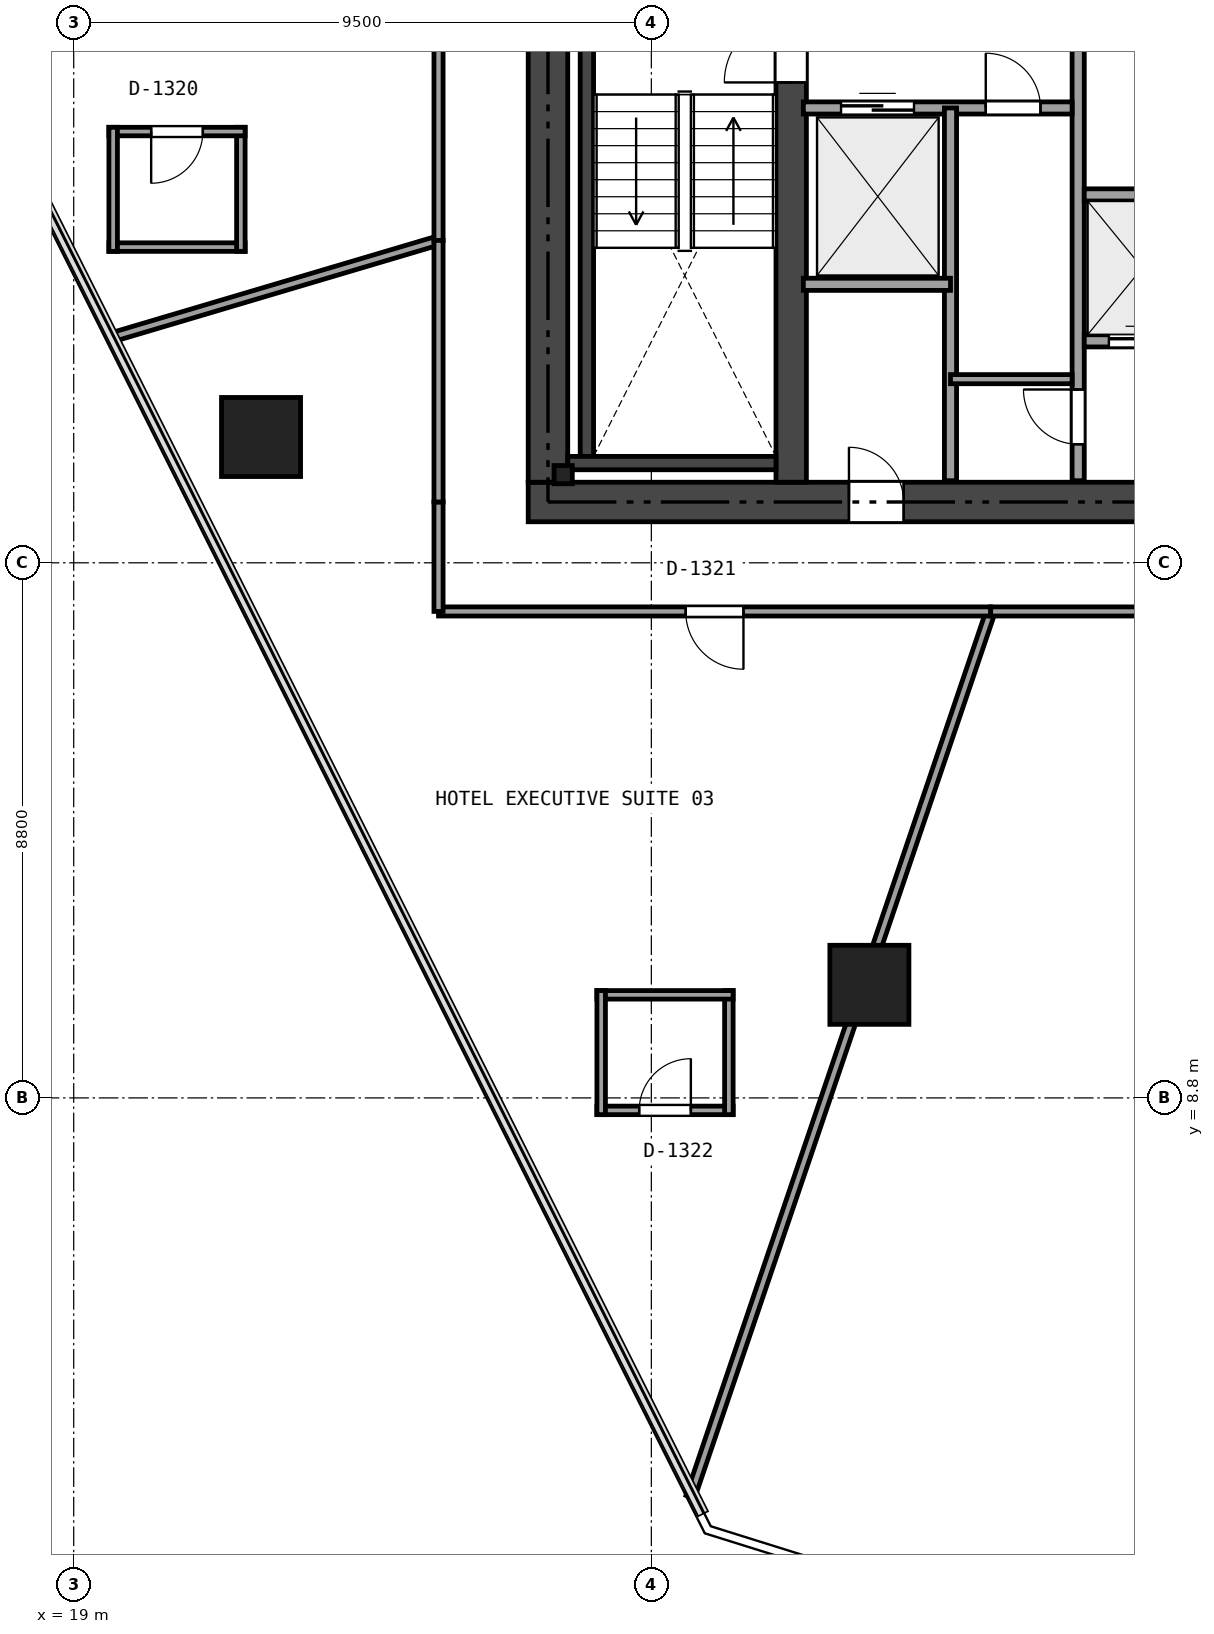
"""IFC4 building model, lengths in metres.
Left out: names, types, materials, properties, quantities, classifications, styles, units other than length and angle.
Written with IfcOpenShell. Run it as: python <this file> out.ifc"""

import sys

from ifc_helpers import new_model, si_unit, direction, frame, frame_2d, origin, origin_2d, place, context, subcontext, project, spatial, rectangle, i_section, extrude, element, fill, save


model = new_model("IFC4")
c1 = context("Model", 3, precision=1e-05, world=origin(), true_north=direction((0.0, 1.0)))
c2 = subcontext(c1, "Body", "Model", "MODEL_VIEW")
j1 = project(units=[si_unit("LENGTHUNIT", "METRE"), si_unit("PLANEANGLEUNIT", "RADIAN")], contexts=[c1])
p1 = place(None, origin())
s1 = spatial("IfcSite", under=j1, at=p1, CompositionType="ELEMENT")
p2 = place(p1, origin())
s2 = spatial("IfcBuilding", under=s1, at=p2, CompositionType="ELEMENT")
p3 = place(p2, frame((0.0, 0.0, 54.6)))
s3 = spatial("IfcBuildingStorey", under=s2, at=p3, CompositionType="ELEMENT", Elevation=54.6)
p4 = place(p3, frame((26.475, 18.6, 0.0), z_axis=(0.0, 0.0, 1.0), x_axis=(1.0, 0.0, 0.0)))
e1 = element("IfcWall", 1, at=p4, inside=s3, PredefinedType="SHEAR", context=c2, shape_type="SweptSolid", body=[
    extrude(rectangle(XDim=21.45, YDim=0.65, at=frame_2d((10.725, 0.0))), origin(), (0.0, 0.0, 1.0), 3.17),
])
p5 = place(p4, frame((12.45, 0.0, 0.0)))
e2 = element("IfcOpeningElement", 2, at=p5, cuts=e1, PredefinedType="OPENING", context=c2, shape_type="SweptSolid", body=[
    extrude(rectangle(XDim=1.15, YDim=2.15, at=frame_2d((0.575, 1.075))), frame((0.0, 0.335, 0.0), z_axis=(0.0, -1.0, 0.0), x_axis=(1.0, 0.0, 0.0)), (0.0, 0.0, 1.0), 0.67),
])
p6 = place(p4, frame((5.275, 0.0, 0.0)))
e3 = element("IfcOpeningElement", 3, at=p6, cuts=e1, PredefinedType="OPENING", context=c2, shape_type="SweptSolid", body=[
    extrude(rectangle(XDim=0.9, YDim=2.1, at=frame_2d((0.45, 1.05))), frame((0.0, 0.335, 0.0), z_axis=(0.0, -1.0, 0.0), x_axis=(1.0, 0.0, 0.0)), (0.0, 0.0, 1.0), 0.67),
])
p7 = place(p3, frame((26.8, 18.925, 0.0), z_axis=(0.0, 0.0, 1.0), x_axis=(0.0, 1.0, 0.0)))
e4 = element("IfcWall", 4, at=p7, inside=s3, PredefinedType="SHEAR", context=c2, shape_type="SweptSolid", body=[
    extrude(rectangle(XDim=14.95, YDim=0.65, at=frame_2d((7.475, 0.0))), origin(), (0.0, 0.0, 1.0), 3.17),
])
p8 = place(p3, frame((30.8, 18.925, 0.0), z_axis=(0.0, 0.0, 1.0), x_axis=(0.0, 1.0, 0.0)))
e5 = element("IfcWall", 5, at=p8, inside=s3, PredefinedType="SHEAR", context=c2, shape_type="SweptSolid", body=[
    extrude(rectangle(XDim=14.95, YDim=0.5, at=frame_2d((7.475, 0.0))), origin(), (0.0, 0.0, 1.0), 3.17),
])
p9 = place(p8, frame((6.575, 0.0, 0.0)))
e6 = element("IfcOpeningElement", 6, at=p9, cuts=e5, PredefinedType="OPENING", context=c2, shape_type="SweptSolid", body=[
    extrude(rectangle(XDim=1.1, YDim=2.15, at=frame_2d((0.55, 1.075))), frame((0.0, 0.26, 0.0), z_axis=(0.0, -1.0, 0.0), x_axis=(1.0, 0.0, 0.0)), (0.0, 0.0, 1.0), 0.52),
])
p10 = place(p8, frame((8.375, 0.0, 0.0)))
e7 = element("IfcOpeningElement", 7, at=p10, cuts=e5, PredefinedType="OPENING", context=c2, shape_type="SweptSolid", body=[
    extrude(rectangle(XDim=0.9, YDim=2.1, at=frame_2d((0.45, 1.05))), frame((0.0, 0.26, 0.0), z_axis=(0.0, -1.0, 0.0), x_axis=(1.0, 0.0, 0.0)), (0.0, 0.0, 1.0), 0.52),
])
p11 = place(p3, frame((27.44, 19.35, 0.0), z_axis=(0.0, 0.0, 1.0), x_axis=(0.0, 1.0, 0.0)))
e8 = element("IfcWall", 8, at=p11, inside=s3, PredefinedType="SHEAR", context=c2, shape_type="SweptSolid", body=[
    extrude(rectangle(XDim=7.4, YDim=0.22, at=frame_2d((3.7, 0.0))), origin(), (0.0, 0.0, 1.0), 3.17),
])
p12 = place(p3, frame((27.125, 19.24, 0.0), z_axis=(0.0, 0.0, 1.0), x_axis=(1.0, 0.0, 0.0)))
e9 = element("IfcWall", 9, at=p12, inside=s3, PredefinedType="SHEAR", context=c2, shape_type="SweptSolid", body=[
    extrude(rectangle(XDim=3.425, YDim=0.22, at=frame_2d((1.712, 0.0))), origin(), (0.0, 0.0, 1.0), 3.17),
])
for number, where, z_axis, x_axis in (
    (10, (22.081, 19.669, 0.0), (0.0, 0.0, 1.0), (1.0, 0.0, 0.0)),
    (11, (32.086, 10.66, 0.0), (0.0, 0.0, 1.0), (1.0, 0.0, 0.0)),
):
    element("IfcColumn", number, at=place(p3, frame(where, z_axis=z_axis, x_axis=x_axis)), inside=s3, PredefinedType="COLUMN", context=c2, shape_type="SweptSolid", body=[
        extrude(rectangle(XDim=1.3, YDim=1.3, at=origin_2d()), origin(), (0.0, 0.0, 1.0), 3.17),
    ])
p13 = place(p3, frame((27.05, 19.05, 0.0), z_axis=(0.0, 0.0, 1.0), x_axis=(1.0, 0.0, 0.0)))
e12 = element("IfcColumn", 12, at=p13, inside=s3, PredefinedType="PILASTER", context=c2, shape_type="SweptSolid", body=[
    extrude(i_section(OverallWidth=0.3, OverallDepth=0.3, WebThickness=0.011, FlangeThickness=0.019, at=origin_2d()), origin(), (0.0, 0.0, 1.0), 3.17),
])
p14 = place(p3, frame((35.52, 18.95, 0.0), z_axis=(0.0, 0.0, 1.0), x_axis=(0.0, 1.0, 0.0)))
e13 = element("IfcWall", 13, at=p14, inside=s3, PredefinedType="SOLIDWALL", context=c2, shape_type="SweptSolid", body=[
    extrude(rectangle(XDim=14.9, YDim=0.2, at=frame_2d((7.45, 0.0))), origin(), (0.0, 0.0, 1.0), 2.691),
])
p15 = place(p14, frame((7.755, 0.0, 0.0)))
e14 = element("IfcOpeningElement", 14, at=p15, cuts=e13, PredefinedType="OPENING", context=c2, shape_type="SweptSolid", body=[
    extrude(rectangle(XDim=0.95, YDim=2.15, at=frame_2d((0.475, 1.075))), frame((0.0, 0.11, 0.0), z_axis=(0.0, -1.0, 0.0), x_axis=(1.0, 0.0, 0.0)), (0.0, 0.0, 1.0), 0.22),
])
p16 = place(p14, frame((0.6, 0.0, 0.0)))
e15 = element("IfcOpeningElement", 15, at=p16, cuts=e13, PredefinedType="OPENING", context=c2, shape_type="SweptSolid", body=[
    extrude(rectangle(XDim=0.9, YDim=2.1, at=frame_2d((0.45, 1.05))), frame((0.0, 0.11, 0.0), z_axis=(0.0, -1.0, 0.0), x_axis=(1.0, 0.0, 0.0)), (0.0, 0.0, 1.0), 0.22),
])
p17 = place(p3, frame((31.0, 25.08, 0.0), z_axis=(0.0, 0.0, 1.0), x_axis=(1.0, 0.0, 0.0)))
e16 = element("IfcWall", 16, at=p17, inside=s3, PredefinedType="SOLIDWALL", context=c2, shape_type="SweptSolid", body=[
    extrude(rectangle(XDim=4.42, YDim=0.2, at=frame_2d((2.21, 0.0))), origin(), (0.0, 0.0, 1.0), 3.17),
])
p18 = place(p17, frame((3.0, 0.0, 0.0)))
e17 = element("IfcOpeningElement", 17, at=p18, cuts=e16, PredefinedType="OPENING", context=c2, shape_type="SweptSolid", body=[
    extrude(rectangle(XDim=0.9, YDim=2.1, at=frame_2d((0.45, 1.05))), frame((0.0, 0.11, 0.0), z_axis=(0.0, -1.0, 0.0), x_axis=(1.0, 0.0, 0.0)), (0.0, 0.0, 1.0), 0.22),
])
p19 = place(p17, frame((0.62, 0.0, 0.0)))
e18 = element("IfcOpeningElement", 18, at=p19, cuts=e16, PredefinedType="OPENING", context=c2, shape_type="SweptSolid", body=[
    extrude(rectangle(XDim=1.2, YDim=2.15, at=frame_2d((0.6, 1.075))), frame((0.0, 0.11, 0.0), z_axis=(0.0, -1.0, 0.0), x_axis=(1.0, 0.0, 0.0)), (0.0, 0.0, 1.0), 0.22),
])
p20 = place(p3, frame((33.42, 18.95, 0.0), z_axis=(0.0, 0.0, 1.0), x_axis=(0.0, 1.0, 0.0)))
e19 = element("IfcWall", 19, at=p20, inside=s3, PredefinedType="SOLIDWALL", context=c2, shape_type="SweptSolid", body=[
    extrude(rectangle(XDim=6.13, YDim=0.2, at=frame_2d((3.065, 0.0))), origin(), (0.0, 0.0, 1.0), 2.691),
])
p21 = place(p3, frame((31.0, 22.18, 0.0), z_axis=(0.0, 0.0, 1.0), x_axis=(1.0, 0.0, 0.0)))
e20 = element("IfcWall", 20, at=p21, inside=s3, PredefinedType="SOLIDWALL", context=c2, shape_type="SweptSolid", body=[
    extrude(rectangle(XDim=2.42, YDim=0.2, at=frame_2d((1.21, 0.0))), origin(), (0.0, 0.0, 1.0), 3.17),
])
p22 = place(p3, frame((33.42, 20.62, 0.0), z_axis=(0.0, 0.0, 1.0), x_axis=(1.0, 0.0, 0.0)))
e21 = element("IfcWall", 21, at=p22, inside=s3, PredefinedType="PARTITIONING", context=c2, shape_type="SweptSolid", body=[
    extrude(rectangle(XDim=2.0, YDim=0.15, at=frame_2d((1.0, 0.0))), origin(), (0.0, 0.0, 1.0), 3.17),
])
p23 = place(p3, frame((35.62, 23.65, 0.0), z_axis=(0.0, 0.0, 1.0), x_axis=(1.0, 0.0, 0.0)))
e22 = element("IfcWall", 22, at=p23, inside=s3, PredefinedType="SOLIDWALL", context=c2, shape_type="SweptSolid", body=[
    extrude(rectangle(XDim=7.88, YDim=0.2, at=frame_2d((3.94, 0.0))), origin(), (0.0, 0.0, 1.0), 2.691),
])
p24 = place(p3, frame((35.62, 21.25, 0.0), z_axis=(0.0, 0.0, 1.0), x_axis=(1.0, 0.0, 0.0)))
e23 = element("IfcWall", 23, at=p24, inside=s3, PredefinedType="SOLIDWALL", context=c2, shape_type="SweptSolid", body=[
    extrude(rectangle(XDim=7.88, YDim=0.2, at=frame_2d((3.94, 0.0))), origin(), (0.0, 0.0, 1.0), 3.17),
])
p25 = place(p24, frame((0.405, 0.0, 0.0)))
e24 = element("IfcOpeningElement", 24, at=p25, cuts=e23, PredefinedType="OPENING", context=c2, shape_type="SweptSolid", body=[
    extrude(rectangle(XDim=1.1, YDim=2.15, at=frame_2d((0.55, 1.075))), frame((0.0, 0.11, 0.0), z_axis=(0.0, -1.0, 0.0), x_axis=(1.0, 0.0, 0.0)), (0.0, 0.0, 1.0), 0.22),
])
p26 = place(p24, frame((2.355, 0.0, 0.0)))
e25 = element("IfcOpeningElement", 25, at=p26, cuts=e23, PredefinedType="OPENING", context=c2, shape_type="SweptSolid", body=[
    extrude(rectangle(XDim=1.1, YDim=2.15, at=frame_2d((0.55, 1.075))), frame((0.0, 0.11, 0.0), z_axis=(0.0, -1.0, 0.0), x_axis=(1.0, 0.0, 0.0)), (0.0, 0.0, 1.0), 0.22),
])
p27 = place(p24, frame((4.305, 0.0, 0.0)))
e26 = element("IfcOpeningElement", 26, at=p27, cuts=e23, PredefinedType="OPENING", context=c2, shape_type="SweptSolid", body=[
    extrude(rectangle(XDim=1.1, YDim=2.15, at=frame_2d((0.55, 1.075))), frame((0.0, 0.11, 0.0), z_axis=(0.0, -1.0, 0.0), x_axis=(1.0, 0.0, 0.0)), (0.0, 0.0, 1.0), 0.22),
])
p28 = place(p24, frame((6.255, 0.0, 0.0)))
e27 = element("IfcOpeningElement", 27, at=p28, cuts=e23, PredefinedType="OPENING", context=c2, shape_type="SweptSolid", body=[
    extrude(rectangle(XDim=1.1, YDim=2.15, at=frame_2d((0.55, 1.075))), frame((0.0, 0.11, 0.0), z_axis=(0.0, -1.0, 0.0), x_axis=(1.0, 0.0, 0.0)), (0.0, 0.0, 1.0), 0.22),
])
p29 = place(p3, frame((19.579, 22.792, 0.0), z_axis=(0.0, 0.0, 1.0), x_axis=(1.0, 0.0, 0.0)))
e28 = element("IfcWall", 28, at=p29, inside=s3, PredefinedType="PARTITIONING", context=c2, shape_type="SweptSolid", body=[
    extrude(rectangle(XDim=2.24, YDim=0.14, at=frame_2d((1.12, 0.0))), origin(), (0.0, 0.0, 1.0), 2.355),
])
p30 = place(p3, frame((21.749, 22.722, 0.0), z_axis=(0.0, 0.0, 1.0), x_axis=(0.0, 1.0, 0.0)))
e29 = element("IfcWall", 29, at=p30, inside=s3, PredefinedType="PARTITIONING", context=c2, shape_type="SweptSolid", body=[
    extrude(rectangle(XDim=2.04, YDim=0.14, at=frame_2d((1.02, 0.0))), origin(), (0.0, 0.0, 1.0), 2.355),
])
p31 = place(p3, frame((21.819, 24.692, 0.0), z_axis=(0.0, 0.0, 1.0), x_axis=(-1.0, 0.0, 0.0)))
e30 = element("IfcWall", 30, at=p31, inside=s3, PredefinedType="PARTITIONING", context=c2, shape_type="SweptSolid", body=[
    extrude(rectangle(XDim=2.24, YDim=0.14, at=frame_2d((1.12, 0.0))), origin(), (0.0, 0.0, 1.0), 2.355),
])
p32 = place(p31, frame((0.695, 0.0, 0.0)))
e31 = element("IfcOpeningElement", 31, at=p32, cuts=e30, PredefinedType="OPENING", context=c2, shape_type="SweptSolid", body=[
    extrude(rectangle(XDim=0.85, YDim=2.1, at=frame_2d((0.425, 1.05))), frame((0.0, 0.08, 0.0), z_axis=(0.0, -1.0, 0.0), x_axis=(1.0, 0.0, 0.0)), (0.0, 0.0, 1.0), 0.16),
])
p33 = place(p3, frame((19.649, 24.762, 0.0), z_axis=(0.0, 0.0, 1.0), x_axis=(0.0, -1.0, 0.0)))
e32 = element("IfcWall", 32, at=p33, inside=s3, PredefinedType="PARTITIONING", context=c2, shape_type="SweptSolid", body=[
    extrude(rectangle(XDim=2.04, YDim=0.14, at=frame_2d((1.02, 0.0))), origin(), (0.0, 0.0, 1.0), 3.17),
])
p34 = place(p3, frame((27.605, 8.595, 0.0), z_axis=(0.0, 0.0, 1.0), x_axis=(1.0, 0.0, 0.0)))
e33 = element("IfcWall", 33, at=p34, inside=s3, PredefinedType="PARTITIONING", context=c2, shape_type="SweptSolid", body=[
    extrude(rectangle(XDim=2.24, YDim=0.14, at=frame_2d((1.12, 0.0))), origin(), (0.0, 0.0, 1.0), 3.17),
])
p35 = place(p34, frame((0.695, 0.0, 0.0)))
e34 = element("IfcOpeningElement", 34, at=p35, cuts=e33, PredefinedType="OPENING", context=c2, shape_type="SweptSolid", body=[
    extrude(rectangle(XDim=0.85, YDim=2.1, at=frame_2d((0.425, 1.05))), frame((0.0, 0.08, 0.0), z_axis=(0.0, -1.0, 0.0), x_axis=(1.0, 0.0, 0.0)), (0.0, 0.0, 1.0), 0.16),
])
p36 = place(p3, frame((29.775, 8.525, 0.0), z_axis=(0.0, 0.0, 1.0), x_axis=(0.0, 1.0, 0.0)))
e35 = element("IfcWall", 35, at=p36, inside=s3, PredefinedType="PARTITIONING", context=c2, shape_type="SweptSolid", body=[
    extrude(rectangle(XDim=2.04, YDim=0.14, at=frame_2d((1.02, 0.0))), origin(), (0.0, 0.0, 1.0), 3.17),
])
p37 = place(p3, frame((29.845, 10.495, 0.0), z_axis=(0.0, 0.0, 1.0), x_axis=(-1.0, 0.0, 0.0)))
e36 = element("IfcWall", 36, at=p37, inside=s3, PredefinedType="PARTITIONING", context=c2, shape_type="SweptSolid", body=[
    extrude(rectangle(XDim=2.24, YDim=0.14, at=frame_2d((1.12, 0.0))), origin(), (0.0, 0.0, 1.0), 3.17),
])
p38 = place(p3, frame((27.675, 10.565, 0.0), z_axis=(0.0, 0.0, 1.0), x_axis=(0.0, -1.0, 0.0)))
e37 = element("IfcWall", 37, at=p38, inside=s3, PredefinedType="PARTITIONING", context=c2, shape_type="SweptSolid", body=[
    extrude(rectangle(XDim=2.04, YDim=0.14, at=frame_2d((1.02, 0.0))), origin(), (0.0, 0.0, 1.0), 3.17),
])
p39 = place(p3, frame((19.604, 21.301, 0.0), z_axis=(0.0, 0.0, 1.0), x_axis=(0.958688645274, 0.284457521297, 0.0)))
e38 = element("IfcWall", 38, at=p39, inside=s3, PredefinedType="PARTITIONING", context=c2, shape_type="SweptSolid", body=[
    extrude(rectangle(XDim=5.628, YDim=0.15, at=frame_2d((2.814, 0.0))), origin(), (0.0, 0.0, 1.0), 2.355),
])
p40 = place(p3, frame((25.0, 22.902, 0.0), z_axis=(0.0, 0.0, 1.0), x_axis=(0.0, 1.0, 0.0)))
e39 = element("IfcWall", 39, at=p40, inside=s3, PredefinedType="PARTITIONING", context=c2, shape_type="SweptSolid", body=[
    extrude(rectangle(XDim=13.098, YDim=0.15, at=frame_2d((6.549, 0.0))), origin(), (0.0, 0.0, 1.0), 2.355),
])
p41 = place(p40, frame((6.074, 0.0, 0.0)))
e40 = element("IfcOpeningElement", 40, at=p41, cuts=e39, PredefinedType="OPENING", context=c2, shape_type="SweptSolid", body=[
    extrude(rectangle(XDim=0.95, YDim=2.15, at=frame_2d((0.475, 1.075))), frame((0.0, 0.085, 0.0), z_axis=(0.0, -1.0, 0.0), x_axis=(1.0, 0.0, 0.0)), (0.0, 0.0, 1.0), 0.17),
])
p42 = place(p3, frame((29.141, 2.24, 0.0), z_axis=(0.0, 0.0, 1.0), x_axis=(0.321291767727, 0.946980253221, 0.0)))
e41 = element("IfcWall", 41, at=p42, inside=s3, PredefinedType="PARTITIONING", context=c2, shape_type="SweptSolid", body=[
    extrude(rectangle(XDim=15.375, YDim=0.15, at=frame_2d((7.688, 0.0))), origin(), (0.0, 0.0, 1.0), 2.395),
])
p43 = place(p3, frame((34.081, 16.8, 0.0), z_axis=(0.0, 0.0, 1.0), x_axis=(-1.0, 0.0, 0.0)))
e42 = element("IfcWall", 42, at=p43, inside=s3, PredefinedType="PARTITIONING", context=c2, shape_type="SweptSolid", body=[
    extrude(rectangle(XDim=9.081, YDim=0.15, at=frame_2d((4.541, 0.0))), origin(), (0.0, 0.0, 1.0), 2.355),
])
p44 = place(p43, frame((4.066, 0.0, 0.0)))
e43 = element("IfcOpeningElement", 43, at=p44, cuts=e42, PredefinedType="OPENING", context=c2, shape_type="SweptSolid", body=[
    extrude(rectangle(XDim=0.95, YDim=2.15, at=frame_2d((0.475, 1.075))), frame((0.0, 0.085, 0.0), z_axis=(0.0, -1.0, 0.0), x_axis=(1.0, 0.0, 0.0)), (0.0, 0.0, 1.0), 0.17),
])
p45 = place(p3, frame((25.0, 16.8, 0.0), z_axis=(0.0, 0.0, 1.0), x_axis=(0.0, 1.0, 0.0)))
e44 = element("IfcWall", 44, at=p45, inside=s3, PredefinedType="PARTITIONING", context=c2, shape_type="SweptSolid", body=[
    extrude(rectangle(XDim=1.8, YDim=0.15, at=frame_2d((0.9, 0.0))), origin(), (0.0, 0.0, 1.0), 2.355),
])
p46 = place(p3, frame((25.0, 18.6, 0.0), z_axis=(0.0, 0.0, 1.0), x_axis=(0.0, 1.0, 0.0)))
e45 = element("IfcWall", 45, at=p46, inside=s3, PredefinedType="PARTITIONING", context=c2, shape_type="SweptSolid", body=[
    extrude(rectangle(XDim=4.302, YDim=0.15, at=frame_2d((2.151, 0.0))), origin(), (0.0, 0.0, 1.0), 2.395),
])
p47 = place(p3, frame((43.675, 16.8, 0.0), z_axis=(0.0, 0.0, 1.0), x_axis=(-1.0, 0.0, 0.0)))
e46 = element("IfcWall", 46, at=p47, inside=s3, PredefinedType="PARTITIONING", context=c2, shape_type="SweptSolid", body=[
    extrude(rectangle(XDim=9.594, YDim=0.15, at=frame_2d((4.797, 0.0))), origin(), (0.0, 0.0, 1.0), 2.395),
])
p48 = place(p47, frame((4.322, 0.0, 0.0)))
e47 = element("IfcOpeningElement", 47, at=p48, cuts=e46, PredefinedType="OPENING", context=c2, shape_type="SweptSolid", body=[
    extrude(rectangle(XDim=0.95, YDim=2.15, at=frame_2d((0.475, 1.075))), frame((0.0, 0.085, 0.0), z_axis=(0.0, -1.0, 0.0), x_axis=(1.0, 0.0, 0.0)), (0.0, 0.0, 1.0), 0.17),
])
p49 = place(p9, origin())
e48 = element("IfcDoor", 48, at=p49, inside=s3, OperationType="SINGLE_SWING_LEFT", PredefinedType="DOOR", context=c2, shape_type="SweptSolid", body=[
    extrude(rectangle(XDim=1.1, YDim=2.15, at=frame_2d((0.55, 1.075))), frame((0.0, 0.025, 0.0), z_axis=(0.0, -1.0, 0.0), x_axis=(1.0, 0.0, 0.0)), (0.0, 0.0, 1.0), 0.05),
])
fill(e6, e48)
p50 = place(p6, origin())
e49 = element("IfcDoor", 49, at=p50, inside=s3, OperationType="SINGLE_SWING_LEFT", PredefinedType="DOOR", context=c2, shape_type="SweptSolid", body=[
    extrude(rectangle(XDim=0.9, YDim=2.1, at=frame_2d((0.45, 1.05))), frame((0.0, 0.025, 0.0), z_axis=(0.0, -1.0, 0.0), x_axis=(1.0, 0.0, 0.0)), (0.0, 0.0, 1.0), 0.05),
])
fill(e3, e49)
p51 = place(p16, origin())
e50 = element("IfcDoor", 50, at=p51, inside=s3, OperationType="SINGLE_SWING_RIGHT", PredefinedType="DOOR", context=c2, shape_type="SweptSolid", body=[
    extrude(rectangle(XDim=0.9, YDim=2.1, at=frame_2d((0.45, 1.05))), frame((0.0, 0.025, 0.0), z_axis=(0.0, -1.0, 0.0), x_axis=(1.0, 0.0, 0.0)), (0.0, 0.0, 1.0), 0.05),
])
fill(e15, e50)
p52 = place(p18, origin())
e51 = element("IfcDoor", 51, at=p52, inside=s3, OperationType="SINGLE_SWING_LEFT", PredefinedType="DOOR", context=c2, shape_type="SweptSolid", body=[
    extrude(rectangle(XDim=0.9, YDim=2.1, at=frame_2d((0.45, 1.05))), frame((0.0, 0.025, 0.0), z_axis=(0.0, -1.0, 0.0), x_axis=(1.0, 0.0, 0.0)), (0.0, 0.0, 1.0), 0.05),
])
fill(e17, e51)
p53 = place(p19, origin())
e52 = element("IfcDoor", 52, at=p53, inside=s3, OperationType="SLIDING_TO_LEFT", PredefinedType="DOOR", context=c2, shape_type="SweptSolid", body=[
    extrude(rectangle(XDim=1.2, YDim=2.15, at=frame_2d((0.6, 1.075))), frame((0.0, 0.025, 0.0), z_axis=(0.0, -1.0, 0.0), x_axis=(1.0, 0.0, 0.0)), (0.0, 0.0, 1.0), 0.05),
])
fill(e18, e52)
p54 = place(p25, origin())
e53 = element("IfcDoor", 53, at=p54, inside=s3, OperationType="SLIDING_TO_LEFT", PredefinedType="DOOR", context=c2, shape_type="SweptSolid", body=[
    extrude(rectangle(XDim=1.1, YDim=2.15, at=frame_2d((0.55, 1.075))), frame((0.0, 0.025, 0.0), z_axis=(0.0, -1.0, 0.0), x_axis=(1.0, 0.0, 0.0)), (0.0, 0.0, 1.0), 0.05),
])
fill(e24, e53)
p55 = place(p32, origin())
e54 = element("IfcDoor", 54, at=p55, inside=s3, OperationType="SINGLE_SWING_RIGHT", PredefinedType="DOOR", context=c2, shape_type="SweptSolid", body=[
    extrude(rectangle(XDim=0.85, YDim=2.1, at=frame_2d((0.425, 1.05))), frame((0.0, 0.025, 0.0), z_axis=(0.0, -1.0, 0.0), x_axis=(1.0, 0.0, 0.0)), (0.0, 0.0, 1.0), 0.05),
])
fill(e31, e54)
p56 = place(p44, origin())
e55 = element("IfcDoor", 55, at=p56, inside=s3, OperationType="SINGLE_SWING_LEFT", PredefinedType="DOOR", context=c2, shape_type="SweptSolid", body=[
    extrude(rectangle(XDim=0.95, YDim=2.15, at=frame_2d((0.475, 1.075))), frame((0.0, 0.025, 0.0), z_axis=(0.0, -1.0, 0.0), x_axis=(1.0, 0.0, 0.0)), (0.0, 0.0, 1.0), 0.05),
])
fill(e43, e55)
p57 = place(p35, origin())
e56 = element("IfcDoor", 56, at=p57, inside=s3, OperationType="SINGLE_SWING_RIGHT", PredefinedType="DOOR", context=c2, shape_type="SweptSolid", body=[
    extrude(rectangle(XDim=0.85, YDim=2.1, at=frame_2d((0.425, 1.05))), frame((0.0, 0.025, 0.0), z_axis=(0.0, -1.0, 0.0), x_axis=(1.0, 0.0, 0.0)), (0.0, 0.0, 1.0), 0.05),
])
fill(e34, e56)
save(model, sys.argv[1])
